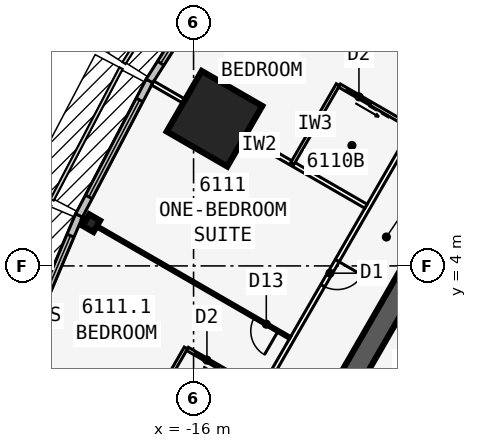
"""IFC4 building model, lengths in metres.
Left out: names, types, materials, properties, quantities, classifications, styles, units other than length and angle.
Written with IfcOpenShell. Run it as: python <this file> out.ifc"""

import sys

from ifc_helpers import new_model, si_unit, direction, frame, frame_2d, origin, origin_2d, place, context, subcontext, project, spatial, rectangle, i_section, extrude, element, fill, save


model = new_model("IFC4")
c1 = context("Model", 3, precision=1e-05, world=origin(), true_north=direction((0.0, 1.0)))
c2 = subcontext(c1, "Body", "Model", "MODEL_VIEW")
j1 = project(units=[si_unit("LENGTHUNIT", "METRE"), si_unit("PLANEANGLEUNIT", "RADIAN")], contexts=[c1])
p1 = place(None, origin())
s1 = spatial("IfcSite", under=j1, at=p1, CompositionType="ELEMENT")
p2 = place(p1, origin())
s2 = spatial("IfcBuilding", under=s1, at=p2, CompositionType="ELEMENT")
p3 = place(p2, frame((0.0, 0.0, 229.7)))
s3 = spatial("IfcBuildingStorey", under=s2, at=p3, CompositionType="ELEMENT", Elevation=229.7)
p4 = place(p3, frame((0.0, 19.052, 0.0), z_axis=(0.0, 0.0, 1.0), x_axis=(-0.499999749417, -0.866025548458, 0.0)))
e1 = element("IfcWall", 1, at=p4, inside=s3, PredefinedType="SHEAR", context=c2, shape_type="SweptSolid", body=[
    extrude(rectangle(XDim=33.0, YDim=0.75, at=frame_2d((16.5, 0.0))), origin(), (0.0, 0.0, 1.0), 3.6),
])
p5 = place(p4, frame((14.15, 0.0, 0.0)))
e2 = element("IfcOpeningElement", 2, at=p5, cuts=e1, PredefinedType="OPENING", context=c2, shape_type="SweptSolid", body=[
    extrude(rectangle(XDim=1.8, YDim=2.13, at=frame_2d((0.9, 1.065))), frame((0.0, 0.385, 0.0), z_axis=(0.0, -1.0, 0.0), x_axis=(1.0, 0.0, 0.0)), (0.0, 0.0, 1.0), 0.77),
])
p6 = place(p4, frame((12.6, 0.0, 0.0)))
e3 = element("IfcOpeningElement", 3, at=p6, cuts=e1, PredefinedType="OPENING", context=c2, shape_type="SweptSolid", body=[
    extrude(rectangle(XDim=1.0, YDim=2.13, at=frame_2d((0.5, 1.065))), frame((0.0, 0.385, 0.0), z_axis=(0.0, -1.0, 0.0), x_axis=(1.0, 0.0, 0.0)), (0.0, 0.0, 1.0), 0.77),
])
p7 = place(p3, frame((-4.929, 3.365, 0.0), z_axis=(0.0, 0.0, 1.0), x_axis=(-0.499991433582, -0.866030349552, 0.0)))
e4 = element("IfcWall", 4, at=p7, inside=s3, PredefinedType="SOLIDWALL", context=c2, shape_type="SweptSolid", body=[
    extrude(rectangle(XDim=10.633, YDim=0.25, at=frame_2d((5.316, 0.0))), origin(), (0.0, 0.0, 1.0), 3.35),
])
p8 = place(p7, frame((9.164, 0.0, 0.0)))
e5 = element("IfcOpeningElement", 5, at=p8, cuts=e4, PredefinedType="OPENING", context=c2, shape_type="SweptSolid", body=[
    extrude(rectangle(XDim=0.9, YDim=2.13, at=frame_2d((0.45, 1.065))), frame((0.0, 0.135, 0.0), z_axis=(0.0, -1.0, 0.0), x_axis=(1.0, 0.0, 0.0)), (0.0, 0.0, 1.0), 0.27),
])
p9 = place(p7, frame((1.1, 0.0, 0.0)))
e6 = element("IfcOpeningElement", 6, at=p9, cuts=e4, PredefinedType="OPENING", context=c2, shape_type="SweptSolid", body=[
    extrude(rectangle(XDim=0.9, YDim=2.13, at=frame_2d((0.45, 1.065))), frame((0.0, 0.135, 0.0), z_axis=(0.0, -1.0, 0.0), x_axis=(1.0, 0.0, 0.0)), (0.0, 0.0, 1.0), 0.27),
])
p10 = place(p7, frame((4.0, 0.0, 0.0)))
e7 = element("IfcOpeningElement", 7, at=p10, cuts=e4, PredefinedType="OPENING", context=c2, shape_type="SweptSolid", body=[
    extrude(rectangle(XDim=0.9, YDim=2.13, at=frame_2d((0.45, 1.065))), frame((0.0, 0.135, 0.0), z_axis=(0.0, -1.0, 0.0), x_axis=(1.0, 0.0, 0.0)), (0.0, 0.0, 1.0), 0.27),
])
p11 = place(p3, frame((-19.363, 5.406, 0.0), z_axis=(0.0, 0.0, 1.0), x_axis=(-0.866025403784, 0.5, 0.0)))
e8 = element("IfcColumn", 8, at=p11, inside=s3, PredefinedType="COLUMN", context=c2, shape_type="SweptSolid", body=[
    extrude(i_section(OverallWidth=0.411, OverallDepth=0.434, WebThickness=0.036, FlangeThickness=0.057, at=origin_2d()), origin(), (0.0, 0.0, 1.0), 3.6),
])
p12 = place(p3, frame((-15.312, 8.84, 0.0), z_axis=(0.0, 0.0, 1.0), x_axis=(-0.866025403784, 0.5, 0.0)))
e9 = element("IfcColumn", 9, at=p12, inside=s3, PredefinedType="COLUMN", context=c2, shape_type="SweptSolid", body=[
    extrude(rectangle(XDim=2.3, YDim=2.3, at=origin_2d()), origin(), (0.0, 0.0, 1.0), 3.6),
])
p13 = place(p3, frame((-14.777, 14.299, 0.0), z_axis=(0.0, 0.0, 1.0), x_axis=(-0.535220361449, -0.844712474568, 0.0)))
e10 = element("IfcWall", 10, at=p13, inside=s3, PredefinedType="STANDARD", context=c2, shape_type="SweptSolid", body=[
    extrude(rectangle(XDim=5.004, YDim=0.25, at=frame_2d((2.502, 0.0))), origin(), (0.0, 0.0, 1.0), 3.35),
])
p14 = place(p13, frame((0.702, 0.0, 0.45)))
e11 = element("IfcOpeningElement", 11, at=p14, cuts=e10, PredefinedType="OPENING", context=c2, shape_type="SweptSolid", body=[
    extrude(rectangle(XDim=3.6, YDim=2.6, at=frame_2d((1.8, 1.3))), frame((0.0, 0.135, 0.0), z_axis=(0.0, -1.0, 0.0), x_axis=(1.0, 0.0, 0.0)), (0.0, 0.0, 1.0), 0.27),
])
p15 = place(p3, frame((-17.45, 10.081, 0.0), z_axis=(0.0, 0.0, 1.0), x_axis=(-0.463976002579, -0.885847768542, 0.0)))
e12 = element("IfcWall", 12, at=p15, inside=s3, PredefinedType="STANDARD", context=c2, shape_type="SweptSolid", body=[
    extrude(rectangle(XDim=5.004, YDim=0.25, at=frame_2d((2.502, 0.0))), origin(), (0.0, 0.0, 1.0), 3.35),
])
p16 = place(p15, frame((0.702, 0.0, 0.45)))
e13 = element("IfcOpeningElement", 13, at=p16, cuts=e12, PredefinedType="OPENING", context=c2, shape_type="SweptSolid", body=[
    extrude(rectangle(XDim=3.6, YDim=2.6, at=frame_2d((1.8, 1.3))), frame((0.0, 0.135, 0.0), z_axis=(0.0, -1.0, 0.0), x_axis=(1.0, 0.0, 0.0)), (0.0, 0.0, 1.0), 0.27),
])
p17 = place(p3, frame((-19.768, 5.657, 0.0), z_axis=(0.0, 0.0, 1.0), x_axis=(-0.390096809471, -0.920773848044, 0.0)))
e14 = element("IfcWall", 14, at=p17, inside=s3, PredefinedType="STANDARD", context=c2, shape_type="SweptSolid", body=[
    extrude(rectangle(XDim=5.038, YDim=0.25, at=frame_2d((2.519, 0.0))), origin(), (0.0, 0.0, 1.0), 3.35),
])
p18 = place(p17, frame((0.719, 0.0, 0.45)))
e15 = element("IfcOpeningElement", 15, at=p18, cuts=e14, PredefinedType="OPENING", context=c2, shape_type="SweptSolid", body=[
    extrude(rectangle(XDim=3.6, YDim=2.6, at=frame_2d((1.8, 1.3))), frame((0.0, 0.135, 0.0), z_axis=(0.0, -1.0, 0.0), x_axis=(1.0, 0.0, 0.0)), (0.0, 0.0, 1.0), 0.27),
])
p19 = place(p3, frame((-0.425, 22.966, 0.0), z_axis=(0.0, 0.0, 1.0), x_axis=(-0.500000265775, -0.866025250339, 0.0)))
e16 = element("IfcWall", 16, at=p19, inside=s3, PredefinedType="PARTITIONING", context=c2, shape_type="SweptSolid", body=[
    extrude(rectangle(XDim=39.354, YDim=0.15, at=frame_2d((19.677, 0.0))), origin(), (0.0, 0.0, 1.0), 3.35),
])
p20 = place(p19, frame((1.665, 0.0, 0.0)))
e17 = element("IfcOpeningElement", 17, at=p20, cuts=e16, PredefinedType="OPENING", context=c2, shape_type="SweptSolid", body=[
    extrude(rectangle(XDim=0.95, YDim=2.13, at=frame_2d((0.475, 1.065))), frame((0.0, 0.085, 0.0), z_axis=(0.0, -1.0, 0.0), x_axis=(1.0, 0.0, 0.0)), (0.0, 0.0, 1.0), 0.17),
])
p21 = place(p19, frame((11.702, 0.0, 0.0)))
e18 = element("IfcOpeningElement", 18, at=p21, cuts=e16, PredefinedType="OPENING", context=c2, shape_type="SweptSolid", body=[
    extrude(rectangle(XDim=0.95, YDim=2.13, at=frame_2d((0.475, 1.065))), frame((0.0, 0.085, 0.0), z_axis=(0.0, -1.0, 0.0), x_axis=(1.0, 0.0, 0.0)), (0.0, 0.0, 1.0), 0.17),
])
p22 = place(p19, frame((21.702, 0.0, 0.0)))
e19 = element("IfcOpeningElement", 19, at=p22, cuts=e16, PredefinedType="OPENING", context=c2, shape_type="SweptSolid", body=[
    extrude(rectangle(XDim=0.95, YDim=2.13, at=frame_2d((0.475, 1.065))), frame((0.0, 0.085, 0.0), z_axis=(0.0, -1.0, 0.0), x_axis=(1.0, 0.0, 0.0)), (0.0, 0.0, 1.0), 0.17),
])
p23 = place(p19, frame((36.739, 0.0, 0.0)))
e20 = element("IfcOpeningElement", 20, at=p23, cuts=e16, PredefinedType="OPENING", context=c2, shape_type="SweptSolid", body=[
    extrude(rectangle(XDim=0.95, YDim=2.13, at=frame_2d((0.475, 1.065))), frame((0.0, 0.085, 0.0), z_axis=(0.0, -1.0, 0.0), x_axis=(1.0, 0.0, 0.0)), (0.0, 0.0, 1.0), 0.17),
])
p24 = place(p3, frame((-7.829, 10.293, 0.0), z_axis=(0.0, 0.0, 1.0), x_axis=(-0.866030558329, 0.49999107196, 0.0)))
e21 = element("IfcWall", 21, at=p24, inside=s3, PredefinedType="PARTITIONING", context=c2, shape_type="SweptSolid", body=[
    extrude(rectangle(XDim=7.894, YDim=0.1, at=frame_2d((3.947, 0.0))), origin(), (0.0, 0.0, 1.0), 2.25),
])
p25 = place(p24, frame((0.45, 0.0, 0.0)))
e22 = element("IfcOpeningElement", 22, at=p25, cuts=e21, PredefinedType="OPENING", context=c2, shape_type="SweptSolid", body=[
    extrude(rectangle(XDim=0.9, YDim=2.13, at=frame_2d((0.45, 1.065))), frame((0.0, 0.06, 0.0), z_axis=(0.0, -1.0, 0.0), x_axis=(1.0, 0.0, 0.0)), (0.0, 0.0, 1.0), 0.12),
])
p26 = place(p3, frame((-10.329, 5.963, 0.0), z_axis=(0.0, 0.0, 1.0), x_axis=(-0.866016460812, 0.500015489362, 0.0)))
e23 = element("IfcWall", 23, at=p26, inside=s3, PredefinedType="PARTITIONING", context=c2, shape_type="SweptSolid", body=[
    extrude(rectangle(XDim=8.101, YDim=0.15, at=frame_2d((4.051, 0.0))), origin(), (0.0, 0.0, 1.0), 2.309),
])
p27 = place(p3, frame((-12.829, 1.633, 0.0), z_axis=(0.0, 0.0, 1.0), x_axis=(-0.866030558329, 0.49999107196, 0.0)))
e24 = element("IfcWall", 24, at=p27, inside=s3, PredefinedType="PARTITIONING", context=c2, shape_type="SweptSolid", body=[
    extrude(rectangle(XDim=7.894, YDim=0.1, at=frame_2d((3.947, 0.0))), origin(), (0.0, 0.0, 1.0), 2.25),
])
p28 = place(p27, frame((0.45, 0.0, 0.0)))
e25 = element("IfcOpeningElement", 25, at=p28, cuts=e24, PredefinedType="OPENING", context=c2, shape_type="SweptSolid", body=[
    extrude(rectangle(XDim=0.9, YDim=2.13, at=frame_2d((0.45, 1.065))), frame((0.0, 0.06, 0.0), z_axis=(0.0, -1.0, 0.0), x_axis=(1.0, 0.0, 0.0)), (0.0, 0.0, 1.0), 0.12),
])
p29 = place(p3, frame((-15.329, -2.697, 0.0), z_axis=(0.0, 0.0, 1.0), x_axis=(-0.866032413668, 0.499987858329, 0.0)))
e26 = element("IfcWall", 26, at=p29, inside=s3, PredefinedType="PARTITIONING", context=c2, shape_type="SweptSolid", body=[
    extrude(rectangle(XDim=7.273, YDim=0.15, at=frame_2d((3.636, 0.0))), origin(), (0.0, 0.0, 1.0), 2.309),
])
p30 = place(p3, frame((-11.253, 9.961, 0.0), z_axis=(0.0, 0.0, 1.0), x_axis=(-0.499990139034, -0.866031096941, 0.0)))
e27 = element("IfcWall", 27, at=p30, inside=s3, PredefinedType="PLUMBINGWALL", context=c2, shape_type="SweptSolid", body=[
    extrude(rectangle(XDim=3.0, YDim=0.12, at=frame_2d((1.5, 0.0))), origin(), (0.0, 0.0, 1.0), 3.35),
])
p31 = place(p3, frame((-8.829, 8.561, 0.0), z_axis=(0.0, 0.0, 1.0), x_axis=(-0.866035715982, 0.499982138324, 0.0)))
e28 = element("IfcWall", 28, at=p31, inside=s3, PredefinedType="PLUMBINGWALL", context=c2, shape_type="SweptSolid", body=[
    extrude(rectangle(XDim=2.74, YDim=0.12, at=frame_2d((1.37, 0.0))), origin(), (0.0, 0.0, 1.0), 3.35),
])
p32 = place(p31, frame((1.55, 0.0, 0.0)))
e29 = element("IfcOpeningElement", 29, at=p32, cuts=e28, PredefinedType="OPENING", context=c2, shape_type="SweptSolid", body=[
    extrude(rectangle(XDim=0.9, YDim=2.13, at=frame_2d((0.45, 1.065))), frame((0.0, 0.07, 0.0), z_axis=(0.0, -1.0, 0.0), x_axis=(1.0, 0.0, 0.0)), (0.0, 0.0, 1.0), 0.14),
])
p33 = place(p3, frame((-16.253, 1.301, 0.0), z_axis=(0.0, 0.0, 1.0), x_axis=(-0.499990139034, -0.866031096941, 0.0)))
e30 = element("IfcWall", 30, at=p33, inside=s3, PredefinedType="PLUMBINGWALL", context=c2, shape_type="SweptSolid", body=[
    extrude(rectangle(XDim=3.0, YDim=0.12, at=frame_2d((1.5, 0.0))), origin(), (0.0, 0.0, 1.0), 3.35),
])
p34 = place(p3, frame((-13.829, -0.099, 0.0), z_axis=(0.0, 0.0, 1.0), x_axis=(-0.865997131366, 0.500048966069, 0.0)))
e31 = element("IfcWall", 31, at=p34, inside=s3, PredefinedType="PLUMBINGWALL", context=c2, shape_type="SweptSolid", body=[
    extrude(rectangle(XDim=2.74, YDim=0.12, at=frame_2d((1.37, 0.0))), origin(), (0.0, 0.0, 1.0), 3.35),
])
p35 = place(p34, frame((1.55, 0.0, 0.0)))
e32 = element("IfcOpeningElement", 32, at=p35, cuts=e31, PredefinedType="OPENING", context=c2, shape_type="SweptSolid", body=[
    extrude(rectangle(XDim=0.9, YDim=2.13, at=frame_2d((0.45, 1.065))), frame((0.0, 0.07, 0.0), z_axis=(0.0, -1.0, 0.0), x_axis=(1.0, 0.0, 0.0)), (0.0, 0.0, 1.0), 0.14),
])
p36 = place(p14, origin())
e33 = element("IfcWindow", 33, at=p36, inside=s3, PartitioningType="SINGLE_PANEL", PredefinedType="WINDOW", context=c2, shape_type="SweptSolid", body=[
    extrude(rectangle(XDim=3.6, YDim=2.6, at=frame_2d((1.8, 1.3))), frame((0.0, 0.03, 0.0), z_axis=(0.0, -1.0, 0.0), x_axis=(1.0, 0.0, 0.0)), (0.0, 0.0, 1.0), 0.06),
])
fill(e11, e33)
p37 = place(p16, origin())
e34 = element("IfcWindow", 34, at=p37, inside=s3, PartitioningType="SINGLE_PANEL", PredefinedType="WINDOW", context=c2, shape_type="SweptSolid", body=[
    extrude(rectangle(XDim=3.6, YDim=2.6, at=frame_2d((1.8, 1.3))), frame((0.0, 0.03, 0.0), z_axis=(0.0, -1.0, 0.0), x_axis=(1.0, 0.0, 0.0)), (0.0, 0.0, 1.0), 0.06),
])
fill(e13, e34)
p38 = place(p18, origin())
e35 = element("IfcWindow", 35, at=p38, inside=s3, PartitioningType="SINGLE_PANEL", PredefinedType="WINDOW", context=c2, shape_type="SweptSolid", body=[
    extrude(rectangle(XDim=3.6, YDim=2.6, at=frame_2d((1.8, 1.3))), frame((0.0, 0.03, 0.0), z_axis=(0.0, -1.0, 0.0), x_axis=(1.0, 0.0, 0.0)), (0.0, 0.0, 1.0), 0.06),
])
fill(e15, e35)
p39 = place(p28, origin())
e36 = element("IfcDoor", 36, at=p39, inside=s3, OperationType="SINGLE_SWING_LEFT", PredefinedType="DOOR", context=c2, shape_type="SweptSolid", body=[
    extrude(rectangle(XDim=0.9, YDim=2.13, at=frame_2d((0.45, 1.065))), frame((0.0, 0.025, 0.0), z_axis=(0.0, -1.0, 0.0), x_axis=(1.0, 0.0, 0.0)), (0.0, 0.0, 1.0), 0.05),
])
fill(e25, e36)
p40 = place(p32, origin())
e37 = element("IfcDoor", 37, at=p40, inside=s3, OperationType="SLIDING_TO_LEFT", PredefinedType="DOOR", context=c2, shape_type="SweptSolid", body=[
    extrude(rectangle(XDim=0.9, YDim=2.13, at=frame_2d((0.45, 1.065))), frame((0.0, 0.025, 0.0), z_axis=(0.0, -1.0, 0.0), x_axis=(1.0, 0.0, 0.0)), (0.0, 0.0, 1.0), 0.05),
])
fill(e29, e37)
p41 = place(p22, origin())
e38 = element("IfcDoor", 38, at=p41, inside=s3, OperationType="SINGLE_SWING_LEFT", PredefinedType="DOOR", context=c2, shape_type="SweptSolid", body=[
    extrude(rectangle(XDim=0.95, YDim=2.13, at=frame_2d((0.475, 1.065))), frame((0.0, 0.025, 0.0), z_axis=(0.0, -1.0, 0.0), x_axis=(1.0, 0.0, 0.0)), (0.0, 0.0, 1.0), 0.05),
])
fill(e19, e38)
p42 = place(p35, origin())
e39 = element("IfcDoor", 39, at=p42, inside=s3, OperationType="SLIDING_TO_LEFT", PredefinedType="DOOR", context=c2, shape_type="SweptSolid", body=[
    extrude(rectangle(XDim=0.9, YDim=2.13, at=frame_2d((0.45, 1.065))), frame((0.0, 0.025, 0.0), z_axis=(0.0, -1.0, 0.0), x_axis=(1.0, 0.0, 0.0)), (0.0, 0.0, 1.0), 0.05),
])
fill(e32, e39)
save(model, sys.argv[1])
